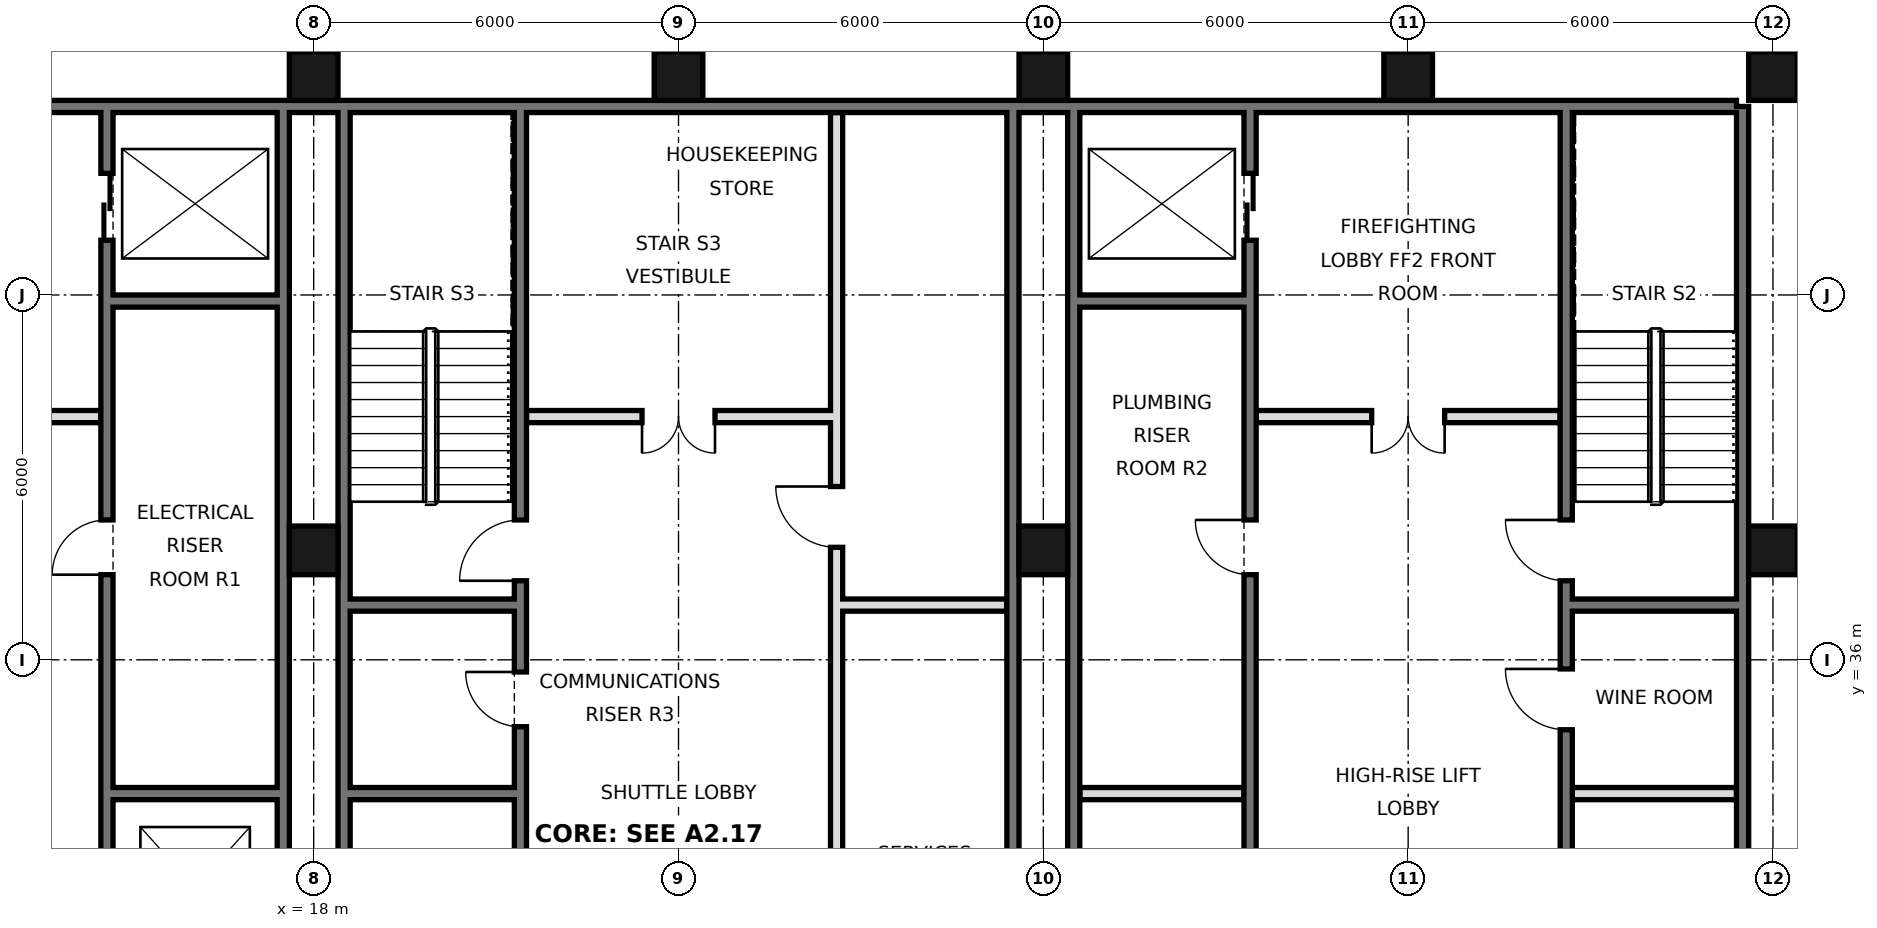
"""IFC4 building model, lengths in metres.
Left out: names, types, materials, properties, quantities, classifications, styles, units other than length and angle.
Written with IfcOpenShell. Run it as: python <this file> out.ifc"""

import sys

from ifc_helpers import new_model, si_unit, direction, frame, frame_2d, origin, origin_2d, place, context, subcontext, project, spatial, rectangle, hollow_rectangle, extrude, element, fill, save


model = new_model("IFC4")
c1 = context("Model", 3, precision=1e-05, world=origin(), true_north=direction((0.0, 1.0)))
c2 = subcontext(c1, "Body", "Model", "MODEL_VIEW")
j1 = project(units=[si_unit("LENGTHUNIT", "METRE"), si_unit("PLANEANGLEUNIT", "RADIAN")], contexts=[c1])
p1 = place(None, origin())
s1 = spatial("IfcSite", under=j1, at=p1, CompositionType="ELEMENT")
p2 = place(p1, origin())
s2 = spatial("IfcBuilding", under=s1, at=p2, CompositionType="ELEMENT")
p3 = place(p2, frame((0.0, 0.0, 67.8)))
s3 = spatial("IfcBuildingStorey", under=s2, at=p3, CompositionType="ELEMENT", Elevation=67.8)
for number, where, z_axis, x_axis in (
    (1, (18.0, 37.8, 0.0), (0.0, 0.0, 1.0), (1.0, 0.0, 0.0)),
    (2, (18.0, 45.6, 0.0), (0.0, 0.0, 1.0), (1.0, 0.0, 0.0)),
    (3, (24.0, 45.6, 0.0), (0.0, 0.0, 1.0), (1.0, 0.0, 0.0)),
    (4, (30.0, 37.8, 0.0), (0.0, 0.0, 1.0), (1.0, 0.0, 0.0)),
    (5, (30.0, 45.6, 0.0), (0.0, 0.0, 1.0), (1.0, 0.0, 0.0)),
    (6, (36.0, 45.6, 0.0), (0.0, 0.0, 1.0), (1.0, 0.0, 0.0)),
    (7, (42.0, 37.8, 0.0), (0.0, 0.0, 1.0), (1.0, 0.0, 0.0)),
    (8, (42.0, 45.6, 0.0), (0.0, 0.0, 1.0), (1.0, 0.0, 0.0)),
):
    element("IfcColumn", number, at=place(p3, frame(where, z_axis=z_axis, x_axis=x_axis)), inside=s3, PredefinedType="COLUMN", context=c2, shape_type="SweptSolid", body=[
        extrude(hollow_rectangle(XDim=0.8, YDim=0.8, WallThickness=0.06, at=origin_2d()), origin(), (0.0, 0.0, 1.0), 3.6),
    ])
p4 = place(p3, frame((41.5, 21.6, 0.0), z_axis=(0.0, 0.0, 1.0), x_axis=(0.0, 1.0, 0.0)))
e9 = element("IfcWall", 9, at=p4, inside=s3, PredefinedType="SOLIDWALL", context=c2, shape_type="SweptSolid", body=[
    extrude(rectangle(XDim=23.5, YDim=0.2, at=frame_2d((11.75, 0.0))), origin(), (0.0, 0.0, 1.0), 3.42),
])
p5 = place(p3, frame((6.6, 45.1, 0.0), z_axis=(0.0, 0.0, 1.0), x_axis=(1.0, 0.0, 0.0)))
e10 = element("IfcWall", 10, at=p5, inside=s3, PredefinedType="SOLIDWALL", context=c2, shape_type="SweptSolid", body=[
    extrude(rectangle(XDim=34.8, YDim=0.2, at=frame_2d((17.4, 0.0))), origin(), (0.0, 0.0, 1.0), 3.42),
])
for number, where, z_axis, x_axis in (
    (11, (17.5, 27.6, 0.0), (0.0, 0.0, 1.0), (0.0, 1.0, 0.0)),
    (12, (18.5, 27.6, 0.0), (0.0, 0.0, 1.0), (0.0, 1.0, 0.0)),
    (13, (29.5, 27.6, 0.0), (0.0, 0.0, 1.0), (0.0, 1.0, 0.0)),
    (14, (30.5, 27.6, 0.0), (0.0, 0.0, 1.0), (0.0, 1.0, 0.0)),
):
    element("IfcWall", number, at=place(p3, frame(where, z_axis=z_axis, x_axis=x_axis)), inside=s3, PredefinedType="SOLIDWALL", context=c2, shape_type="SweptSolid", body=[
        extrude(rectangle(XDim=17.5, YDim=0.2, at=frame_2d((8.75, 0.0))), origin(), (0.0, 0.0, 1.0), 3.42),
    ])
p6 = place(p3, frame((14.6, 27.5, 0.0), z_axis=(0.0, 0.0, 1.0), x_axis=(0.0, 1.0, 0.0)))
e15 = element("IfcWall", 15, at=p6, inside=s3, PredefinedType="SOLIDWALL", context=c2, shape_type="SweptSolid", body=[
    extrude(rectangle(XDim=17.5, YDim=0.2, at=frame_2d((8.75, 0.0))), origin(), (0.0, 0.0, 1.0), 3.42),
])
p7 = place(p6, frame((1.1, 0.0, 0.0)))
e16 = element("IfcOpeningElement", 16, at=p7, cuts=e15, PredefinedType="OPENING", context=c2, shape_type="SweptSolid", body=[
    extrude(rectangle(XDim=1.1, YDim=2.1, at=frame_2d((0.55, 1.05))), frame((0.0, 0.11, 0.0), z_axis=(0.0, -1.0, 0.0), x_axis=(1.0, 0.0, 0.0)), (0.0, 0.0, 1.0), 0.22),
])
p8 = place(p6, frame((4.2, 0.0, 0.0)))
e17 = element("IfcOpeningElement", 17, at=p8, cuts=e15, PredefinedType="OPENING", context=c2, shape_type="SweptSolid", body=[
    extrude(rectangle(XDim=1.1, YDim=2.1, at=frame_2d((0.55, 1.05))), frame((0.0, 0.11, 0.0), z_axis=(0.0, -1.0, 0.0), x_axis=(1.0, 0.0, 0.0)), (0.0, 0.0, 1.0), 0.22),
])
p9 = place(p6, frame((15.4, 0.0, 0.0)))
e18 = element("IfcOpeningElement", 18, at=p9, cuts=e15, PredefinedType="OPENING", context=c2, shape_type="SweptSolid", body=[
    extrude(rectangle(XDim=1.1, YDim=2.1, at=frame_2d((0.55, 1.05))), frame((0.0, 0.11, 0.0), z_axis=(0.0, -1.0, 0.0), x_axis=(1.0, 0.0, 0.0)), (0.0, 0.0, 1.0), 0.22),
])
p10 = place(p6, frame((9.9, 0.0, 0.0)))
e19 = element("IfcOpeningElement", 19, at=p10, cuts=e15, PredefinedType="OPENING", context=c2, shape_type="SweptSolid", body=[
    extrude(rectangle(XDim=0.9, YDim=2.1, at=frame_2d((0.45, 1.05))), frame((0.0, 0.11, 0.0), z_axis=(0.0, -1.0, 0.0), x_axis=(1.0, 0.0, 0.0)), (0.0, 0.0, 1.0), 0.22),
])
p11 = place(p3, frame((21.4, 27.5, 0.0), z_axis=(0.0, 0.0, 1.0), x_axis=(0.0, 1.0, 0.0)))
e20 = element("IfcWall", 20, at=p11, inside=s3, PredefinedType="SOLIDWALL", context=c2, shape_type="SweptSolid", body=[
    extrude(rectangle(XDim=17.5, YDim=0.2, at=frame_2d((8.75, 0.0))), origin(), (0.0, 0.0, 1.0), 3.42),
])
p12 = place(p11, frame((9.8, 0.0, 0.0)))
e21 = element("IfcOpeningElement", 21, at=p12, cuts=e20, PredefinedType="OPENING", context=c2, shape_type="SweptSolid", body=[
    extrude(rectangle(XDim=1.0, YDim=2.1, at=frame_2d((0.5, 1.05))), frame((0.0, 0.11, 0.0), z_axis=(0.0, -1.0, 0.0), x_axis=(1.0, 0.0, 0.0)), (0.0, 0.0, 1.0), 0.22),
])
p13 = place(p11, frame((7.4, 0.0, 0.0)))
e22 = element("IfcOpeningElement", 22, at=p13, cuts=e20, PredefinedType="OPENING", context=c2, shape_type="SweptSolid", body=[
    extrude(rectangle(XDim=0.9, YDim=2.1, at=frame_2d((0.45, 1.05))), frame((0.0, 0.11, 0.0), z_axis=(0.0, -1.0, 0.0), x_axis=(1.0, 0.0, 0.0)), (0.0, 0.0, 1.0), 0.22),
])
p14 = place(p3, frame((26.6, 27.5, 0.0), z_axis=(0.0, 0.0, 1.0), x_axis=(0.0, 1.0, 0.0)))
e23 = element("IfcWall", 23, at=p14, inside=s3, PredefinedType="SOLIDWALL", context=c2, shape_type="SweptSolid", body=[
    extrude(rectangle(XDim=17.5, YDim=0.2, at=frame_2d((8.75, 0.0))), origin(), (0.0, 0.0, 1.0), 3.42),
])
p15 = place(p14, frame((4.3, 0.0, 0.0)))
e24 = element("IfcOpeningElement", 24, at=p15, cuts=e23, PredefinedType="OPENING", context=c2, shape_type="SweptSolid", body=[
    extrude(rectangle(XDim=0.9, YDim=2.1, at=frame_2d((0.45, 1.05))), frame((0.0, 0.11, 0.0), z_axis=(0.0, -1.0, 0.0), x_axis=(1.0, 0.0, 0.0)), (0.0, 0.0, 1.0), 0.22),
])
p16 = place(p14, frame((10.35, 0.0, 0.0)))
e25 = element("IfcOpeningElement", 25, at=p16, cuts=e23, PredefinedType="OPENING", context=c2, shape_type="SweptSolid", body=[
    extrude(rectangle(XDim=1.0, YDim=2.1, at=frame_2d((0.5, 1.05))), frame((0.0, 0.11, 0.0), z_axis=(0.0, -1.0, 0.0), x_axis=(1.0, 0.0, 0.0)), (0.0, 0.0, 1.0), 0.22),
])
p17 = place(p3, frame((33.4, 27.5, 0.0), z_axis=(0.0, 0.0, 1.0), x_axis=(0.0, 1.0, 0.0)))
e26 = element("IfcWall", 26, at=p17, inside=s3, PredefinedType="SOLIDWALL", context=c2, shape_type="SweptSolid", body=[
    extrude(rectangle(XDim=17.5, YDim=0.2, at=frame_2d((8.75, 0.0))), origin(), (0.0, 0.0, 1.0), 3.42),
])
p18 = place(p17, frame((15.4, 0.0, 0.0)))
e27 = element("IfcOpeningElement", 27, at=p18, cuts=e26, PredefinedType="OPENING", context=c2, shape_type="SweptSolid", body=[
    extrude(rectangle(XDim=1.1, YDim=2.1, at=frame_2d((0.55, 1.05))), frame((0.0, 0.11, 0.0), z_axis=(0.0, -1.0, 0.0), x_axis=(1.0, 0.0, 0.0)), (0.0, 0.0, 1.0), 0.22),
])
p19 = place(p17, frame((2.7, 0.0, 0.0)))
e28 = element("IfcOpeningElement", 28, at=p19, cuts=e26, PredefinedType="OPENING", context=c2, shape_type="SweptSolid", body=[
    extrude(rectangle(XDim=1.0, YDim=2.1, at=frame_2d((0.5, 1.05))), frame((0.0, 0.11, 0.0), z_axis=(0.0, -1.0, 0.0), x_axis=(1.0, 0.0, 0.0)), (0.0, 0.0, 1.0), 0.22),
])
p20 = place(p17, frame((9.9, 0.0, 0.0)))
e29 = element("IfcOpeningElement", 29, at=p20, cuts=e26, PredefinedType="OPENING", context=c2, shape_type="SweptSolid", body=[
    extrude(rectangle(XDim=0.9, YDim=2.1, at=frame_2d((0.45, 1.05))), frame((0.0, 0.11, 0.0), z_axis=(0.0, -1.0, 0.0), x_axis=(1.0, 0.0, 0.0)), (0.0, 0.0, 1.0), 0.22),
])
p21 = place(p3, frame((38.6, 21.6, 0.0), z_axis=(0.0, 0.0, 1.0), x_axis=(0.0, 1.0, 0.0)))
e30 = element("IfcWall", 30, at=p21, inside=s3, PredefinedType="SOLIDWALL", context=c2, shape_type="SweptSolid", body=[
    extrude(rectangle(XDim=23.4, YDim=0.2, at=frame_2d((11.7, 0.0))), origin(), (0.0, 0.0, 1.0), 3.42),
])
p22 = place(p21, frame((8.6, 0.0, 0.0)))
e31 = element("IfcOpeningElement", 31, at=p22, cuts=e30, PredefinedType="OPENING", context=c2, shape_type="SweptSolid", body=[
    extrude(rectangle(XDim=1.0, YDim=2.1, at=frame_2d((0.5, 1.05))), frame((0.0, 0.11, 0.0), z_axis=(0.0, -1.0, 0.0), x_axis=(1.0, 0.0, 0.0)), (0.0, 0.0, 1.0), 0.22),
])
p23 = place(p21, frame((13.25, 0.0, 0.0)))
e32 = element("IfcOpeningElement", 32, at=p23, cuts=e30, PredefinedType="OPENING", context=c2, shape_type="SweptSolid", body=[
    extrude(rectangle(XDim=1.0, YDim=2.1, at=frame_2d((0.5, 1.05))), frame((0.0, 0.11, 0.0), z_axis=(0.0, -1.0, 0.0), x_axis=(1.0, 0.0, 0.0)), (0.0, 0.0, 1.0), 0.22),
])
p24 = place(p21, frame((15.7, 0.0, 0.0)))
e33 = element("IfcOpeningElement", 33, at=p24, cuts=e30, PredefinedType="OPENING", context=c2, shape_type="SweptSolid", body=[
    extrude(rectangle(XDim=1.0, YDim=2.1, at=frame_2d((0.5, 1.05))), frame((0.0, 0.11, 0.0), z_axis=(0.0, -1.0, 0.0), x_axis=(1.0, 0.0, 0.0)), (0.0, 0.0, 1.0), 0.22),
])
p25 = place(p21, frame((0.175, 0.0, 0.0)))
e34 = element("IfcOpeningElement", 34, at=p25, cuts=e30, PredefinedType="OPENING", context=c2, shape_type="SweptSolid", body=[
    extrude(rectangle(XDim=0.9, YDim=2.1, at=frame_2d((0.45, 1.05))), frame((0.0, 0.11, 0.0), z_axis=(0.0, -1.0, 0.0), x_axis=(1.0, 0.0, 0.0)), (0.0, 0.0, 1.0), 0.22),
])
for number, where, z_axis, x_axis in (
    (35, (14.7, 33.8, 0.0), (0.0, 0.0, 1.0), (1.0, 0.0, 0.0)),
    (36, (18.6, 33.8, 0.0), (0.0, 0.0, 1.0), (1.0, 0.0, 0.0)),
    (37, (30.6, 33.8, 0.0), (0.0, 0.0, 1.0), (1.0, 0.0, 0.0)),
):
    element("IfcWall", number, at=place(p3, frame(where, z_axis=z_axis, x_axis=x_axis)), inside=s3, PredefinedType="SOLIDWALL", context=c2, shape_type="SweptSolid", body=[
        extrude(rectangle(XDim=2.7, YDim=0.2, at=frame_2d((1.35, 0.0))), origin(), (0.0, 0.0, 1.0), 3.42),
    ])
p26 = place(p3, frame((38.7, 33.8, 0.0), z_axis=(0.0, 0.0, 1.0), x_axis=(1.0, 0.0, 0.0)))
e38 = element("IfcWall", 38, at=p26, inside=s3, PredefinedType="PARTITIONING", context=c2, shape_type="SweptSolid", body=[
    extrude(rectangle(XDim=2.7, YDim=0.2, at=frame_2d((1.35, 0.0))), origin(), (0.0, 0.0, 1.0), 3.42),
])
for number, where, z_axis, x_axis in (
    (39, (18.6, 36.9, 0.0), (0.0, 0.0, 1.0), (1.0, 0.0, 0.0)),
    (40, (26.7, 36.9, 0.0), (0.0, 0.0, 1.0), (1.0, 0.0, 0.0)),
    (41, (38.7, 36.9, 0.0), (0.0, 0.0, 1.0), (1.0, 0.0, 0.0)),
):
    element("IfcWall", number, at=place(p3, frame(where, z_axis=z_axis, x_axis=x_axis)), inside=s3, PredefinedType="SOLIDWALL", context=c2, shape_type="SweptSolid", body=[
        extrude(rectangle(XDim=2.7, YDim=0.2, at=frame_2d((1.35, 0.0))), origin(), (0.0, 0.0, 1.0), 3.42),
    ])
p27 = place(p3, frame((21.5, 40.0, 0.0), z_axis=(0.0, 0.0, 1.0), x_axis=(1.0, 0.0, 0.0)))
e42 = element("IfcWall", 42, at=p27, inside=s3, PredefinedType="PARTITIONING", context=c2, shape_type="SweptSolid", body=[
    extrude(rectangle(XDim=5.0, YDim=0.2, at=frame_2d((2.5, 0.0))), origin(), (0.0, 0.0, 1.0), 3.42),
])
p28 = place(p27, frame((1.9, 0.0, 0.0)))
e43 = element("IfcOpeningElement", 43, at=p28, cuts=e42, PredefinedType="OPENING", context=c2, shape_type="SweptSolid", body=[
    extrude(rectangle(XDim=1.2, YDim=2.1, at=frame_2d((0.6, 1.05))), frame((0.0, 0.11, 0.0), z_axis=(0.0, -1.0, 0.0), x_axis=(1.0, 0.0, 0.0)), (0.0, 0.0, 1.0), 0.22),
])
p29 = place(p3, frame((33.5, 40.0, 0.0), z_axis=(0.0, 0.0, 1.0), x_axis=(1.0, 0.0, 0.0)))
e44 = element("IfcWall", 44, at=p29, inside=s3, PredefinedType="PARTITIONING", context=c2, shape_type="SweptSolid", body=[
    extrude(rectangle(XDim=5.0, YDim=0.2, at=frame_2d((2.5, 0.0))), origin(), (0.0, 0.0, 1.0), 3.42),
])
p30 = place(p29, frame((1.9, 0.0, 0.0)))
e45 = element("IfcOpeningElement", 45, at=p30, cuts=e44, PredefinedType="OPENING", context=c2, shape_type="SweptSolid", body=[
    extrude(rectangle(XDim=1.2, YDim=2.1, at=frame_2d((0.6, 1.05))), frame((0.0, 0.11, 0.0), z_axis=(0.0, -1.0, 0.0), x_axis=(1.0, 0.0, 0.0)), (0.0, 0.0, 1.0), 0.22),
])
p31 = place(p3, frame((9.5, 40.0, 0.0), z_axis=(0.0, 0.0, 1.0), x_axis=(1.0, 0.0, 0.0)))
e46 = element("IfcWall", 46, at=p31, inside=s3, PredefinedType="PARTITIONING", context=c2, shape_type="SweptSolid", body=[
    extrude(rectangle(XDim=5.0, YDim=0.2, at=frame_2d((2.5, 0.0))), origin(), (0.0, 0.0, 1.0), 3.42),
])
p32 = place(p31, frame((1.9, 0.0, 0.0)))
e47 = element("IfcOpeningElement", 47, at=p32, cuts=e46, PredefinedType="OPENING", context=c2, shape_type="SweptSolid", body=[
    extrude(rectangle(XDim=1.2, YDim=2.1, at=frame_2d((0.6, 1.05))), frame((0.0, 0.11, 0.0), z_axis=(0.0, -1.0, 0.0), x_axis=(1.0, 0.0, 0.0)), (0.0, 0.0, 1.0), 0.22),
])
for number, where, z_axis, x_axis in (
    (48, (14.7, 41.9, 0.0), (0.0, 0.0, 1.0), (1.0, 0.0, 0.0)),
    (49, (30.6, 41.9, 0.0), (0.0, 0.0, 1.0), (1.0, 0.0, 0.0)),
):
    element("IfcWall", number, at=place(p3, frame(where, z_axis=z_axis, x_axis=x_axis)), inside=s3, PredefinedType="SOLIDWALL", context=c2, shape_type="SweptSolid", body=[
        extrude(rectangle(XDim=2.7, YDim=0.2, at=frame_2d((1.35, 0.0))), origin(), (0.0, 0.0, 1.0), 3.42),
    ])
p33 = place(p28, frame((1.2, 0.0, 0.0), z_axis=(0.0, 0.0, 1.0), x_axis=(-1.0, 0.0, 0.0)))
e50 = element("IfcDoor", 50, at=p33, inside=s3, OperationType="DOUBLE_DOOR_SINGLE_SWING", PredefinedType="DOOR", context=c2, shape_type="SweptSolid", body=[
    extrude(rectangle(XDim=1.2, YDim=2.1, at=frame_2d((0.6, 1.05))), frame((0.0, 0.025, 0.0), z_axis=(0.0, -1.0, 0.0), x_axis=(1.0, 0.0, 0.0)), (0.0, 0.0, 1.0), 0.05),
])
fill(e43, e50)
p34 = place(p30, frame((1.2, 0.0, 0.0), z_axis=(0.0, 0.0, 1.0), x_axis=(-1.0, 0.0, 0.0)))
e51 = element("IfcDoor", 51, at=p34, inside=s3, OperationType="DOUBLE_DOOR_SINGLE_SWING", PredefinedType="DOOR", context=c2, shape_type="SweptSolid", body=[
    extrude(rectangle(XDim=1.2, YDim=2.1, at=frame_2d((0.6, 1.05))), frame((0.0, 0.025, 0.0), z_axis=(0.0, -1.0, 0.0), x_axis=(1.0, 0.0, 0.0)), (0.0, 0.0, 1.0), 0.05),
])
fill(e45, e51)
p35 = place(p18, origin())
e52 = element("IfcDoor", 52, at=p35, inside=s3, OperationType="DOUBLE_DOOR_SLIDING", PredefinedType="DOOR", context=c2, shape_type="SweptSolid", body=[
    extrude(rectangle(XDim=1.1, YDim=2.1, at=frame_2d((0.55, 1.05))), frame((0.0, 0.025, 0.0), z_axis=(0.0, -1.0, 0.0), x_axis=(1.0, 0.0, 0.0)), (0.0, 0.0, 1.0), 0.05),
])
fill(e27, e52)
p36 = place(p9, origin())
e53 = element("IfcDoor", 53, at=p36, inside=s3, OperationType="DOUBLE_DOOR_SLIDING", PredefinedType="DOOR", context=c2, shape_type="SweptSolid", body=[
    extrude(rectangle(XDim=1.1, YDim=2.1, at=frame_2d((0.55, 1.05))), frame((0.0, 0.025, 0.0), z_axis=(0.0, -1.0, 0.0), x_axis=(1.0, 0.0, 0.0)), (0.0, 0.0, 1.0), 0.05),
])
fill(e18, e53)
p37 = place(p23, frame((1.0, 0.0, 0.0), z_axis=(0.0, 0.0, 1.0), x_axis=(-1.0, 0.0, 0.0)))
e54 = element("IfcDoor", 54, at=p37, inside=s3, OperationType="SINGLE_SWING_LEFT", PredefinedType="DOOR", context=c2, shape_type="SweptSolid", body=[
    extrude(rectangle(XDim=1.0, YDim=2.1, at=frame_2d((0.5, 1.05))), frame((0.0, 0.025, 0.0), z_axis=(0.0, -1.0, 0.0), x_axis=(1.0, 0.0, 0.0)), (0.0, 0.0, 1.0), 0.05),
])
fill(e32, e54)
p38 = place(p24, frame((1.0, 0.0, 0.0), z_axis=(0.0, 0.0, 1.0), x_axis=(-1.0, 0.0, 0.0)))
e55 = element("IfcDoor", 55, at=p38, inside=s3, OperationType="SINGLE_SWING_LEFT", PredefinedType="DOOR", context=c2, shape_type="SweptSolid", body=[
    extrude(rectangle(XDim=1.0, YDim=2.1, at=frame_2d((0.5, 1.05))), frame((0.0, 0.025, 0.0), z_axis=(0.0, -1.0, 0.0), x_axis=(1.0, 0.0, 0.0)), (0.0, 0.0, 1.0), 0.05),
])
fill(e33, e55)
p39 = place(p12, origin())
e56 = element("IfcDoor", 56, at=p39, inside=s3, OperationType="SINGLE_SWING_LEFT", PredefinedType="DOOR", context=c2, shape_type="SweptSolid", body=[
    extrude(rectangle(XDim=1.0, YDim=2.1, at=frame_2d((0.5, 1.05))), frame((0.0, 0.025, 0.0), z_axis=(0.0, -1.0, 0.0), x_axis=(1.0, 0.0, 0.0)), (0.0, 0.0, 1.0), 0.05),
])
fill(e21, e56)
p40 = place(p10, origin())
e57 = element("IfcDoor", 57, at=p40, inside=s3, OperationType="SINGLE_SWING_LEFT", PredefinedType="DOOR", context=c2, shape_type="SweptSolid", body=[
    extrude(rectangle(XDim=0.9, YDim=2.1, at=frame_2d((0.45, 1.05))), frame((0.0, 0.025, 0.0), z_axis=(0.0, -1.0, 0.0), x_axis=(1.0, 0.0, 0.0)), (0.0, 0.0, 1.0), 0.05),
])
fill(e19, e57)
p41 = place(p20, frame((0.9, 0.0, 0.0), z_axis=(0.0, 0.0, 1.0), x_axis=(-1.0, 0.0, 0.0)))
e58 = element("IfcDoor", 58, at=p41, inside=s3, OperationType="SINGLE_SWING_LEFT", PredefinedType="DOOR", context=c2, shape_type="SweptSolid", body=[
    extrude(rectangle(XDim=0.9, YDim=2.1, at=frame_2d((0.45, 1.05))), frame((0.0, 0.025, 0.0), z_axis=(0.0, -1.0, 0.0), x_axis=(1.0, 0.0, 0.0)), (0.0, 0.0, 1.0), 0.05),
])
fill(e29, e58)
p42 = place(p13, frame((0.9, 0.0, 0.0), z_axis=(0.0, 0.0, 1.0), x_axis=(-1.0, 0.0, 0.0)))
e59 = element("IfcDoor", 59, at=p42, inside=s3, OperationType="SINGLE_SWING_LEFT", PredefinedType="DOOR", context=c2, shape_type="SweptSolid", body=[
    extrude(rectangle(XDim=0.9, YDim=2.1, at=frame_2d((0.45, 1.05))), frame((0.0, 0.025, 0.0), z_axis=(0.0, -1.0, 0.0), x_axis=(1.0, 0.0, 0.0)), (0.0, 0.0, 1.0), 0.05),
])
fill(e22, e59)
p43 = place(p16, frame((1.0, 0.0, 0.0), z_axis=(0.0, 0.0, 1.0), x_axis=(-1.0, 0.0, 0.0)))
e60 = element("IfcDoor", 60, at=p43, inside=s3, OperationType="SINGLE_SWING_LEFT", PredefinedType="DOOR", context=c2, shape_type="SweptSolid", body=[
    extrude(rectangle(XDim=1.0, YDim=2.1, at=frame_2d((0.5, 1.05))), frame((0.0, 0.025, 0.0), z_axis=(0.0, -1.0, 0.0), x_axis=(1.0, 0.0, 0.0)), (0.0, 0.0, 1.0), 0.05),
])
fill(e25, e60)
save(model, sys.argv[1])
